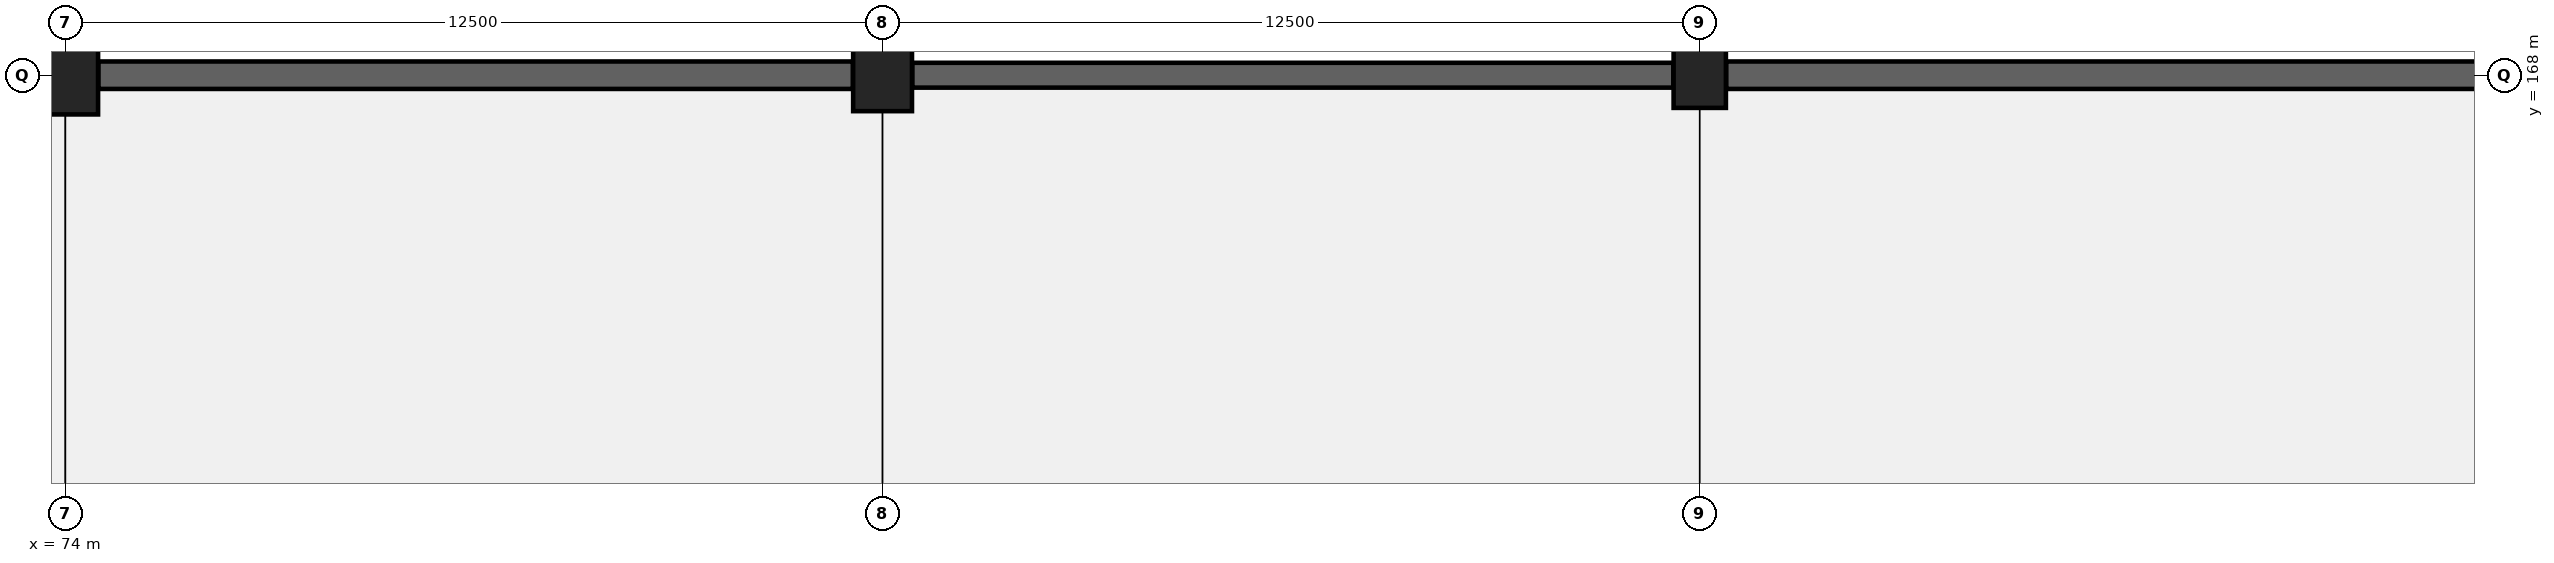
"""IFC4 building model, lengths in metres.
Left out: names, types, materials, properties, quantities, classifications, styles, units other than length and angle.
Written with IfcOpenShell. Run it as: python <this file> out.ifc"""

import sys

from ifc_helpers import new_model, si_unit, direction, frame, frame_2d, origin, origin_2d, place, context, subcontext, project, spatial, rectangle, extrude, element, save


model = new_model("IFC4")
c1 = context("Model", 3, precision=1e-05, world=origin(), true_north=direction((0.0, 1.0)))
c2 = subcontext(c1, "Body", "Model", "MODEL_VIEW")
j1 = project(units=[si_unit("LENGTHUNIT", "METRE"), si_unit("PLANEANGLEUNIT", "RADIAN")], contexts=[c1])
p1 = place(None, origin())
s1 = spatial("IfcSite", under=j1, at=p1, CompositionType="ELEMENT")
p2 = place(p1, origin())
s2 = spatial("IfcBuilding", under=s1, at=p2, CompositionType="ELEMENT")
p3 = place(p2, frame((0.0, 0.0, -4.8)))
s3 = spatial("IfcBuildingStorey", under=s2, at=p3, CompositionType="ELEMENT", Elevation=-4.8)
p4 = place(p3, frame((74.0, 168.0, 0.0), z_axis=(0.0, 0.0, 1.0), x_axis=(1.0, 0.0, 0.0)))
e1 = element("IfcColumn", 1, at=p4, inside=s3, PredefinedType="COLUMN", context=c2, shape_type="SweptSolid", body=[
    extrude(rectangle(XDim=1.0, YDim=1.2, at=origin_2d()), origin(), (0.0, 0.0, 1.0), 4.8),
])
p5 = place(p3, frame((86.5, 168.0, 0.0), z_axis=(0.0, 0.0, 1.0), x_axis=(1.0, 0.0, 0.0)))
e2 = element("IfcColumn", 2, at=p5, inside=s3, PredefinedType="COLUMN", context=c2, shape_type="SweptSolid", body=[
    extrude(rectangle(XDim=0.9, YDim=1.1, at=origin_2d()), origin(), (0.0, 0.0, 1.0), 4.8),
])
p6 = place(p3, frame((99.0, 168.0, 0.0), z_axis=(0.0, 0.0, 1.0), x_axis=(1.0, 0.0, 0.0)))
e3 = element("IfcColumn", 3, at=p6, inside=s3, PredefinedType="COLUMN", context=c2, shape_type="SweptSolid", body=[
    extrude(rectangle(XDim=0.8, YDim=1.0, at=origin_2d()), origin(), (0.0, 0.0, 1.0), 4.8),
])
p7 = place(p3, frame((74.504, 168.0, 0.0), z_axis=(0.0, 0.0, 1.0), x_axis=(1.0, 0.0, 0.0)))
e4 = element("IfcWall", 4, at=p7, inside=s3, PredefinedType="STANDARD", context=c2, shape_type="SweptSolid", body=[
    extrude(rectangle(XDim=11.542, YDim=0.42, at=frame_2d((5.771, 0.0))), origin(), (0.0, 0.0, 1.0), 4.46),
])
p8 = place(p3, frame((86.954, 168.0, 0.0), z_axis=(0.0, 0.0, 1.0), x_axis=(1.0, 0.0, 0.0)))
e5 = element("IfcWall", 5, at=p8, inside=s3, PredefinedType="STANDARD", context=c2, shape_type="SweptSolid", body=[
    extrude(rectangle(XDim=11.642, YDim=0.38, at=frame_2d((5.821, 0.0))), origin(), (0.0, 0.0, 1.0), 4.46),
])
p9 = place(p3, frame((99.404, 168.0, 0.0), z_axis=(0.0, 0.0, 1.0), x_axis=(1.0, 0.0, 0.0)))
e6 = element("IfcWall", 6, at=p9, inside=s3, PredefinedType="STANDARD", context=c2, shape_type="SweptSolid", body=[
    extrude(rectangle(XDim=12.167, YDim=0.42, at=frame_2d((6.083, 0.0))), origin(), (0.0, 0.0, 1.0), 4.46),
])
save(model, sys.argv[1])
